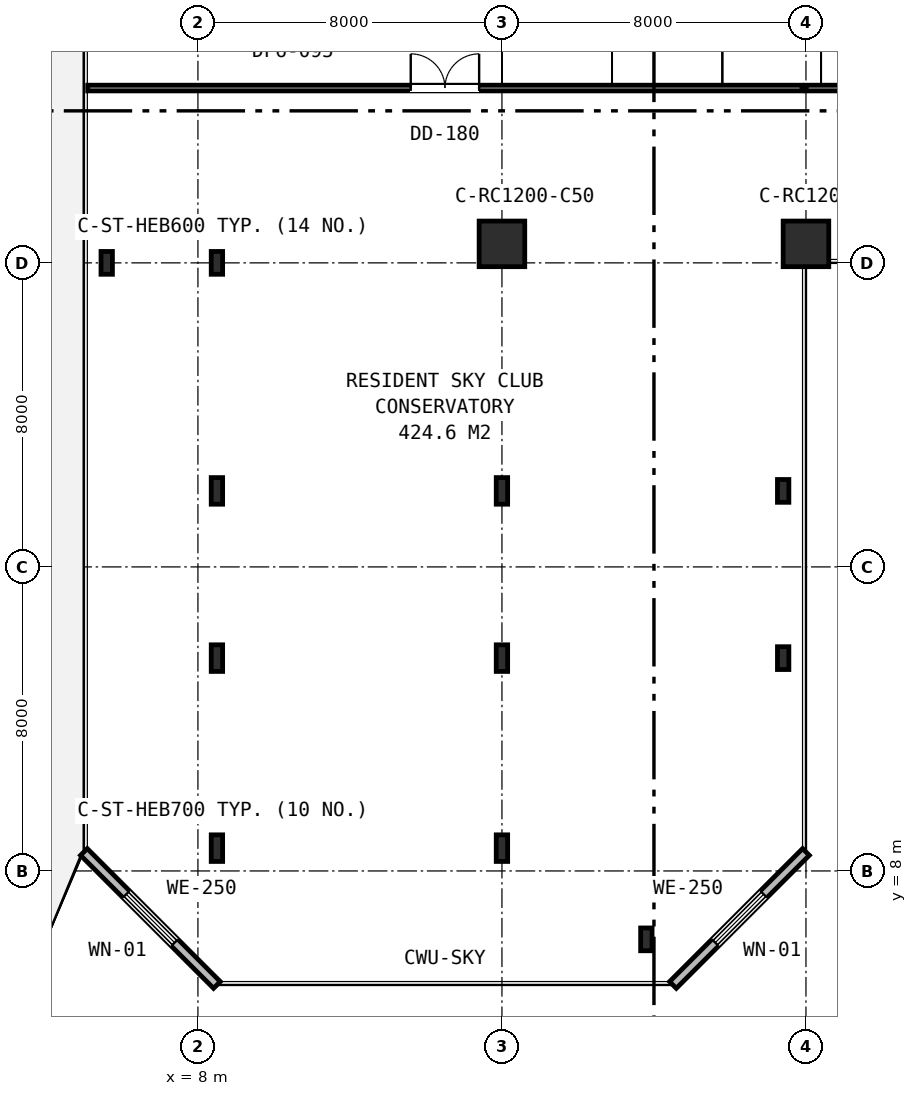
"""IFC4 building model, lengths in metres.
Left out: names, types, materials, properties, quantities, classifications, styles, units other than length and angle.
Written with IfcOpenShell. Run it as: python <this file> out.ifc"""

import sys

from ifc_helpers import new_model, si_unit, direction, frame, frame_2d, origin, origin_2d, place, context, subcontext, project, spatial, rectangle, i_section, extrude, element, fill, save


model = new_model("IFC4")
c1 = context("Model", 3, precision=1e-05, world=origin(), true_north=direction((0.0, 1.0)))
c2 = subcontext(c1, "Body", "Model", "MODEL_VIEW")
j1 = project(units=[si_unit("LENGTHUNIT", "METRE"), si_unit("PLANEANGLEUNIT", "RADIAN")], contexts=[c1])
p1 = place(None, origin())
s1 = spatial("IfcSite", under=j1, at=p1, CompositionType="ELEMENT")
p2 = place(p1, origin())
s2 = spatial("IfcBuilding", under=s1, at=p2, CompositionType="ELEMENT")
p3 = place(p2, frame((0.0, 0.0, 148.8)))
s3 = spatial("IfcBuildingStorey", under=s2, at=p3, CompositionType="ELEMENT", Elevation=148.8)
p4 = place(p3, frame((8.5, 24.0, 0.0), z_axis=(0.0, 0.0, 1.0), x_axis=(1.0, 0.0, 0.0)))
e1 = element("IfcColumn", 1, at=p4, inside=s3, PredefinedType="COLUMN", context=c2, shape_type="SweptSolid", body=[
    extrude(i_section(OverallWidth=0.3, OverallDepth=0.6, WebThickness=0.015, FlangeThickness=0.03, FilletRadius=0.027, at=origin_2d()), origin(), (0.0, 0.0, 1.0), 5.4),
])
for number, where, z_axis, x_axis in (
    (2, (16.0, 24.5, 0.0), (0.0, 0.0, 1.0), (1.0, 0.0, 0.0)),
    (3, (24.0, 24.5, 0.0), (0.0, 0.0, 1.0), (1.0, 0.0, 0.0)),
):
    element("IfcColumn", number, at=place(p3, frame(where, z_axis=z_axis, x_axis=x_axis)), inside=s3, PredefinedType="COLUMN", context=c2, shape_type="SweptSolid", body=[
        extrude(rectangle(XDim=1.2, YDim=1.2, at=origin_2d()), origin(), (0.0, 0.0, 1.0), 5.4),
    ])
for number, where, z_axis, x_axis in (
    (4, (5.6, 24.0, 0.0), (0.0, 0.0, 1.0), (1.0, 0.0, 0.0)),
    (5, (19.8, 6.2, 0.0), (0.0, 0.0, 1.0), (1.0, 0.0, 0.0)),
    (6, (23.4, 13.6, 0.0), (0.0, 0.0, 1.0), (1.0, 0.0, 0.0)),
    (7, (23.4, 18.0, 0.0), (0.0, 0.0, 1.0), (1.0, 0.0, 0.0)),
):
    element("IfcColumn", number, at=place(p3, frame(where, z_axis=z_axis, x_axis=x_axis)), inside=s3, PredefinedType="COLUMN", context=c2, shape_type="SweptSolid", body=[
        extrude(i_section(OverallWidth=0.3, OverallDepth=0.6, WebThickness=0.015, FlangeThickness=0.03, FilletRadius=0.027, at=origin_2d()), origin(), (0.0, 0.0, 1.0), 5.4),
    ])
for number, where, z_axis, x_axis in (
    (8, (8.5, 8.6, 0.0), (0.0, 0.0, 1.0), (1.0, 0.0, 0.0)),
    (9, (16.0, 8.6, 0.0), (0.0, 0.0, 1.0), (1.0, 0.0, 0.0)),
    (10, (8.5, 13.6, 0.0), (0.0, 0.0, 1.0), (1.0, 0.0, 0.0)),
    (11, (16.0, 13.6, 0.0), (0.0, 0.0, 1.0), (1.0, 0.0, 0.0)),
    (12, (8.5, 18.0, 0.0), (0.0, 0.0, 1.0), (1.0, 0.0, 0.0)),
    (13, (16.0, 18.0, 0.0), (0.0, 0.0, 1.0), (1.0, 0.0, 0.0)),
):
    element("IfcColumn", number, at=place(p3, frame(where, z_axis=z_axis, x_axis=x_axis)), inside=s3, PredefinedType="COLUMN", context=c2, shape_type="SweptSolid", body=[
        extrude(i_section(OverallWidth=0.3, OverallDepth=0.7, WebThickness=0.017, FlangeThickness=0.032, FilletRadius=0.027, at=origin_2d()), origin(), (0.0, 0.0, 1.0), 5.4),
    ])
p5 = place(p3, frame((20.5, 5.0, 0.0), z_axis=(0.0, 0.0, 1.0), x_axis=(0.707106781187, 0.707106781187, 0.0)))
e14 = element("IfcWall", 14, at=p5, inside=s3, PredefinedType="STANDARD", context=c2, shape_type="SweptSolid", body=[
    extrude(rectangle(XDim=4.95, YDim=0.25, at=frame_2d((2.475, 0.0))), origin(), (0.0, 0.0, 1.0), 5.13),
])
p6 = place(p5, frame((1.575, 0.0, 0.75)))
e15 = element("IfcOpeningElement", 15, at=p6, cuts=e14, PredefinedType="OPENING", context=c2, shape_type="SweptSolid", body=[
    extrude(rectangle(XDim=1.8, YDim=1.85, at=frame_2d((0.9, 0.925))), frame((0.0, 0.135, 0.0), z_axis=(0.0, -1.0, 0.0), x_axis=(1.0, 0.0, 0.0)), (0.0, 0.0, 1.0), 0.27),
])
p7 = place(p3, frame((5.0, 8.5, 0.0), z_axis=(0.0, 0.0, 1.0), x_axis=(0.707106781187, -0.707106781187, 0.0)))
e16 = element("IfcWall", 16, at=p7, inside=s3, PredefinedType="STANDARD", context=c2, shape_type="SweptSolid", body=[
    extrude(rectangle(XDim=4.95, YDim=0.25, at=frame_2d((2.475, 0.0))), origin(), (0.0, 0.0, 1.0), 5.13),
])
p8 = place(p7, frame((1.575, 0.0, 0.75)))
e17 = element("IfcOpeningElement", 17, at=p8, cuts=e16, PredefinedType="OPENING", context=c2, shape_type="SweptSolid", body=[
    extrude(rectangle(XDim=1.8, YDim=1.85, at=frame_2d((0.9, 0.925))), frame((0.0, 0.135, 0.0), z_axis=(0.0, -1.0, 0.0), x_axis=(1.0, 0.0, 0.0)), (0.0, 0.0, 1.0), 0.27),
])
p9 = place(p3, frame((24.0, 28.6, 0.0), z_axis=(0.0, 0.0, 1.0), x_axis=(1.0, 0.0, 0.0)))
e18 = element("IfcWall", 18, at=p9, inside=s3, PredefinedType="PARTITIONING", context=c2, shape_type="SweptSolid", body=[
    extrude(rectangle(XDim=26.9, YDim=0.15, at=frame_2d((13.45, 0.0))), origin(), (0.0, 0.0, 1.0), 4.73),
])
p10 = place(p9, frame((5.1, 0.0, 0.0)))
e19 = element("IfcOpeningElement", 19, at=p10, cuts=e18, PredefinedType="OPENING", context=c2, shape_type="SweptSolid", body=[
    extrude(rectangle(XDim=1.8, YDim=2.15, at=frame_2d((0.9, 1.075))), frame((0.0, 0.085, 0.0), z_axis=(0.0, -1.0, 0.0), x_axis=(1.0, 0.0, 0.0)), (0.0, 0.0, 1.0), 0.17),
])
p11 = place(p9, frame((17.099, 0.0, 0.0)))
e20 = element("IfcOpeningElement", 20, at=p11, cuts=e18, PredefinedType="OPENING", context=c2, shape_type="SweptSolid", body=[
    extrude(rectangle(XDim=1.8, YDim=2.15, at=frame_2d((0.9, 1.075))), frame((0.0, 0.085, 0.0), z_axis=(0.0, -1.0, 0.0), x_axis=(1.0, 0.0, 0.0)), (0.0, 0.0, 1.0), 0.17),
])
p12 = place(p3, frame((5.1, 28.6, 0.0), z_axis=(0.0, 0.0, 1.0), x_axis=(1.0, 0.0, 0.0)))
e21 = element("IfcWall", 21, at=p12, inside=s3, PredefinedType="PARTITIONING", context=c2, shape_type="SweptSolid", body=[
    extrude(rectangle(XDim=18.8, YDim=0.15, at=frame_2d((9.4, 0.0))), origin(), (0.0, 0.0, 1.0), 4.73),
])
p13 = place(p12, frame((8.5, 0.0, 0.0)))
e22 = element("IfcOpeningElement", 22, at=p13, cuts=e21, PredefinedType="OPENING", context=c2, shape_type="SweptSolid", body=[
    extrude(rectangle(XDim=1.8, YDim=2.15, at=frame_2d((0.9, 1.075))), frame((0.0, 0.085, 0.0), z_axis=(0.0, -1.0, 0.0), x_axis=(1.0, 0.0, 0.0)), (0.0, 0.0, 1.0), 0.17),
])
p14 = place(p6, origin())
e23 = element("IfcWindow", 23, at=p14, inside=s3, PartitioningType="SINGLE_PANEL", PredefinedType="WINDOW", context=c2, shape_type="SweptSolid", body=[
    extrude(rectangle(XDim=1.8, YDim=1.85, at=frame_2d((0.9, 0.925))), frame((0.0, 0.03, 0.0), z_axis=(0.0, -1.0, 0.0), x_axis=(1.0, 0.0, 0.0)), (0.0, 0.0, 1.0), 0.06),
])
fill(e15, e23)
p15 = place(p8, origin())
e24 = element("IfcWindow", 24, at=p15, inside=s3, PartitioningType="SINGLE_PANEL", PredefinedType="WINDOW", context=c2, shape_type="SweptSolid", body=[
    extrude(rectangle(XDim=1.8, YDim=1.85, at=frame_2d((0.9, 0.925))), frame((0.0, 0.03, 0.0), z_axis=(0.0, -1.0, 0.0), x_axis=(1.0, 0.0, 0.0)), (0.0, 0.0, 1.0), 0.06),
])
fill(e17, e24)
p16 = place(p13, origin())
e25 = element("IfcDoor", 25, at=p16, inside=s3, OperationType="DOUBLE_DOOR_SINGLE_SWING", PredefinedType="DOOR", context=c2, shape_type="SweptSolid", body=[
    extrude(rectangle(XDim=1.8, YDim=2.15, at=frame_2d((0.9, 1.075))), frame((0.0, 0.025, 0.0), z_axis=(0.0, -1.0, 0.0), x_axis=(1.0, 0.0, 0.0)), (0.0, 0.0, 1.0), 0.05),
])
fill(e22, e25)
save(model, sys.argv[1])
